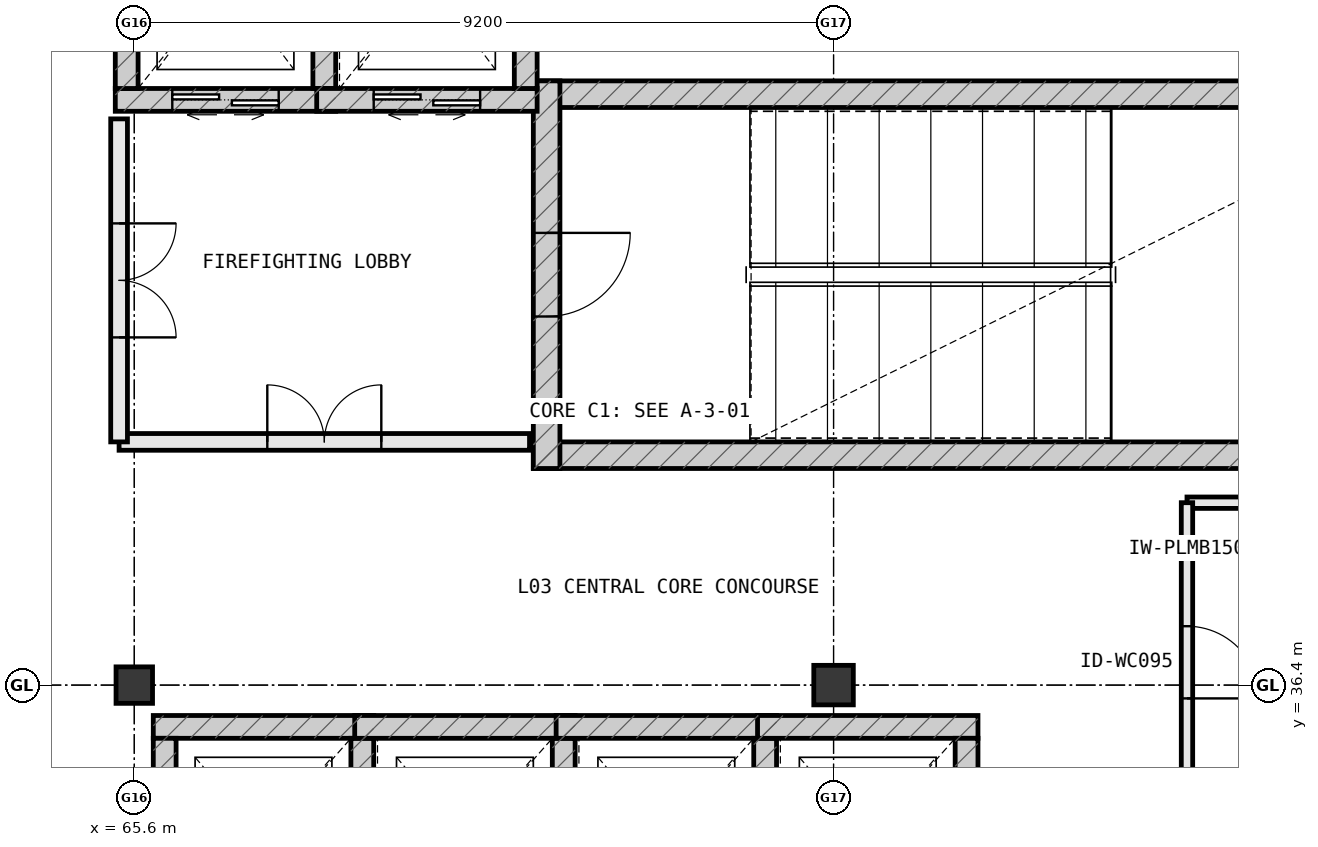
"""IFC4 building model, lengths in metres.
Left out: names, types, materials, properties, quantities, classifications, styles, units other than length and angle.
Written with IfcOpenShell. Run it as: python <this file> out.ifc"""

import sys

from ifc_helpers import new_model, si_unit, direction, frame, frame_2d, origin, origin_2d, place, context, subcontext, project, spatial, rectangle, extrude, element, fill, save


model = new_model("IFC4")
c1 = context("Model", 3, precision=1e-05, world=origin(), true_north=direction((0.0, 1.0)))
c2 = subcontext(c1, "Body", "Model", "MODEL_VIEW")
j1 = project(units=[si_unit("LENGTHUNIT", "METRE"), si_unit("PLANEANGLEUNIT", "RADIAN")], contexts=[c1])
p1 = place(None, origin())
s1 = spatial("IfcSite", under=j1, at=p1, CompositionType="ELEMENT")
p2 = place(p1, origin())
s2 = spatial("IfcBuilding", under=s1, at=p2, CompositionType="ELEMENT")
p3 = place(p2, frame((0.0, 0.0, 16.2)))
s3 = spatial("IfcBuildingStorey", under=s2, at=p3, CompositionType="ELEMENT", Elevation=16.2)
p4 = place(p3, frame((74.8, 36.4, 0.0), z_axis=(0.0, 0.0, 1.0), x_axis=(1.0, 0.0, 0.0)))
e1 = element("IfcColumn", 1, at=p4, inside=s3, PredefinedType="COLUMN", context=c2, shape_type="SweptSolid", body=[
    extrude(rectangle(XDim=0.52, YDim=0.52, at=origin_2d()), origin(), (0.0, 0.0, 1.0), 3.8),
])
p5 = place(p3, frame((65.6, 36.4, 0.0), z_axis=(0.0, 0.0, 1.0), x_axis=(1.0, 0.0, 0.0)))
e2 = element("IfcColumn", 2, at=p5, inside=s3, PredefinedType="COLUMN", context=c2, shape_type="SweptSolid", body=[
    extrude(rectangle(XDim=0.48, YDim=0.48, at=origin_2d()), origin(), (0.0, 0.0, 1.0), 3.8),
])
for number, where, z_axis, x_axis in (
    (3, (70.85, 39.425, 0.0), (0.0, 0.0, 1.0), (1.0, 0.0, 0.0)),
    (4, (82.95, 44.175, 0.0), (0.0, 0.0, 1.0), (-1.0, 0.0, 0.0)),
):
    element("IfcWall", number, at=place(p3, frame(where, z_axis=z_axis, x_axis=x_axis)), inside=s3, PredefinedType="SHEAR", context=c2, shape_type="SweptSolid", body=[
        extrude(rectangle(XDim=12.1, YDim=0.35, at=frame_2d((6.05, 0.0))), origin(), (0.0, 0.0, 1.0), 3.8),
    ])
p6 = place(p3, frame((71.025, 44.35, 0.0), z_axis=(0.0, 0.0, 1.0), x_axis=(0.0, -1.0, 0.0)))
e5 = element("IfcWall", 5, at=p6, inside=s3, PredefinedType="SHEAR", context=c2, shape_type="SweptSolid", body=[
    extrude(rectangle(XDim=5.1, YDim=0.35, at=frame_2d((2.55, 0.0))), origin(), (0.0, 0.0, 1.0), 3.8),
])
p7 = place(p6, frame((2.0, 0.0, 0.0)))
e6 = element("IfcOpeningElement", 6, at=p7, cuts=e5, PredefinedType="OPENING", context=c2, shape_type="SweptSolid", body=[
    extrude(rectangle(XDim=1.1, YDim=2.2, at=frame_2d((0.55, 1.1))), frame((0.0, 0.187, 0.0), z_axis=(0.0, -1.0, 0.0), x_axis=(1.0, 0.0, 0.0)), (0.0, 0.0, 1.0), 0.374),
])
p8 = place(p3, frame((65.35, 44.1, 0.0), z_axis=(0.0, 0.0, 1.0), x_axis=(1.0, 0.0, 0.0)))
e7 = element("IfcWall", 7, at=p8, inside=s3, PredefinedType="SHEAR", context=c2, shape_type="SweptSolid", body=[
    extrude(rectangle(XDim=2.9, YDim=0.3, at=frame_2d((1.45, 0.0))), origin(), (0.0, 0.0, 1.0), 3.8),
])
p9 = place(p8, frame((0.75, 0.0, 0.0)))
e8 = element("IfcOpeningElement", 8, at=p9, cuts=e7, PredefinedType="OPENING", context=c2, shape_type="SweptSolid", body=[
    extrude(rectangle(XDim=1.4, YDim=2.2, at=frame_2d((0.7, 1.1))), frame((0.0, 0.162, 0.0), z_axis=(0.0, -1.0, 0.0), x_axis=(1.0, 0.0, 0.0)), (0.0, 0.0, 1.0), 0.324),
])
for number, where, z_axis, x_axis in (
    (9, (68.1, 44.25, 0.0), (0.0, 0.0, 1.0), (0.0, 1.0, 0.0)),
    (10, (65.5, 47.15, 0.0), (0.0, 0.0, 1.0), (0.0, -1.0, 0.0)),
):
    element("IfcWall", number, at=place(p3, frame(where, z_axis=z_axis, x_axis=x_axis)), inside=s3, PredefinedType="SHEAR", context=c2, shape_type="SweptSolid", body=[
        extrude(rectangle(XDim=2.9, YDim=0.3, at=frame_2d((1.45, 0.0))), origin(), (0.0, 0.0, 1.0), 3.8),
    ])
p10 = place(p3, frame((68.0, 44.1, 0.0), z_axis=(0.0, 0.0, 1.0), x_axis=(1.0, 0.0, 0.0)))
e11 = element("IfcWall", 11, at=p10, inside=s3, PredefinedType="SHEAR", context=c2, shape_type="SweptSolid", body=[
    extrude(rectangle(XDim=2.9, YDim=0.3, at=frame_2d((1.45, 0.0))), origin(), (0.0, 0.0, 1.0), 3.8),
])
p11 = place(p10, frame((0.75, 0.0, 0.0)))
e12 = element("IfcOpeningElement", 12, at=p11, cuts=e11, PredefinedType="OPENING", context=c2, shape_type="SweptSolid", body=[
    extrude(rectangle(XDim=1.4, YDim=2.2, at=frame_2d((0.7, 1.1))), frame((0.0, 0.162, 0.0), z_axis=(0.0, -1.0, 0.0), x_axis=(1.0, 0.0, 0.0)), (0.0, 0.0, 1.0), 0.324),
])
for number, where, z_axis, x_axis in (
    (13, (70.75, 44.25, 0.0), (0.0, 0.0, 1.0), (0.0, 1.0, 0.0)),
    (14, (68.75, 35.85, 0.0), (0.0, 0.0, 1.0), (-1.0, 0.0, 0.0)),
):
    element("IfcWall", number, at=place(p3, frame(where, z_axis=z_axis, x_axis=x_axis)), inside=s3, PredefinedType="SHEAR", context=c2, shape_type="SweptSolid", body=[
        extrude(rectangle(XDim=2.9, YDim=0.3, at=frame_2d((1.45, 0.0))), origin(), (0.0, 0.0, 1.0), 3.8),
    ])
for number, where, z_axis, x_axis in (
    (15, (68.6, 33.1, 0.0), (0.0, 0.0, 1.0), (0.0, 1.0, 0.0)),
    (16, (66.0, 35.7, 0.0), (0.0, 0.0, 1.0), (0.0, -1.0, 0.0)),
):
    element("IfcWall", number, at=place(p3, frame(where, z_axis=z_axis, x_axis=x_axis)), inside=s3, PredefinedType="SHEAR", context=c2, shape_type="SweptSolid", body=[
        extrude(rectangle(XDim=2.6, YDim=0.3, at=frame_2d((1.3, 0.0))), origin(), (0.0, 0.0, 1.0), 3.8),
    ])
p12 = place(p3, frame((71.4, 35.85, 0.0), z_axis=(0.0, 0.0, 1.0), x_axis=(-1.0, 0.0, 0.0)))
e17 = element("IfcWall", 17, at=p12, inside=s3, PredefinedType="SHEAR", context=c2, shape_type="SweptSolid", body=[
    extrude(rectangle(XDim=2.9, YDim=0.3, at=frame_2d((1.45, 0.0))), origin(), (0.0, 0.0, 1.0), 3.8),
])
p13 = place(p3, frame((71.25, 33.1, 0.0), z_axis=(0.0, 0.0, 1.0), x_axis=(0.0, 1.0, 0.0)))
e18 = element("IfcWall", 18, at=p13, inside=s3, PredefinedType="SHEAR", context=c2, shape_type="SweptSolid", body=[
    extrude(rectangle(XDim=2.6, YDim=0.3, at=frame_2d((1.3, 0.0))), origin(), (0.0, 0.0, 1.0), 3.8),
])
p14 = place(p3, frame((74.05, 35.85, 0.0), z_axis=(0.0, 0.0, 1.0), x_axis=(-1.0, 0.0, 0.0)))
e19 = element("IfcWall", 19, at=p14, inside=s3, PredefinedType="SHEAR", context=c2, shape_type="SweptSolid", body=[
    extrude(rectangle(XDim=2.9, YDim=0.3, at=frame_2d((1.45, 0.0))), origin(), (0.0, 0.0, 1.0), 3.8),
])
p15 = place(p3, frame((73.9, 33.1, 0.0), z_axis=(0.0, 0.0, 1.0), x_axis=(0.0, 1.0, 0.0)))
e20 = element("IfcWall", 20, at=p15, inside=s3, PredefinedType="SHEAR", context=c2, shape_type="SweptSolid", body=[
    extrude(rectangle(XDim=2.6, YDim=0.3, at=frame_2d((1.3, 0.0))), origin(), (0.0, 0.0, 1.0), 3.8),
])
p16 = place(p3, frame((76.7, 35.85, 0.0), z_axis=(0.0, 0.0, 1.0), x_axis=(-1.0, 0.0, 0.0)))
e21 = element("IfcWall", 21, at=p16, inside=s3, PredefinedType="SHEAR", context=c2, shape_type="SweptSolid", body=[
    extrude(rectangle(XDim=2.9, YDim=0.3, at=frame_2d((1.45, 0.0))), origin(), (0.0, 0.0, 1.0), 3.8),
])
p17 = place(p3, frame((76.55, 33.1, 0.0), z_axis=(0.0, 0.0, 1.0), x_axis=(0.0, 1.0, 0.0)))
e22 = element("IfcWall", 22, at=p17, inside=s3, PredefinedType="SHEAR", context=c2, shape_type="SweptSolid", body=[
    extrude(rectangle(XDim=2.6, YDim=0.3, at=frame_2d((1.3, 0.0))), origin(), (0.0, 0.0, 1.0), 3.8),
])
p18 = place(p3, frame((65.4, 39.6, 0.0), z_axis=(0.0, 0.0, 1.0), x_axis=(1.0, 0.0, 0.0)))
e23 = element("IfcWall", 23, at=p18, inside=s3, PredefinedType="STANDARD", context=c2, shape_type="SweptSolid", body=[
    extrude(rectangle(XDim=5.4, YDim=0.22, at=frame_2d((2.7, 0.0))), origin(), (0.0, 0.0, 1.0), 3.56),
])
p19 = place(p18, frame((1.95, 0.0, 0.0)))
e24 = element("IfcOpeningElement", 24, at=p19, cuts=e23, PredefinedType="OPENING", context=c2, shape_type="SweptSolid", body=[
    extrude(rectangle(XDim=1.5, YDim=2.2, at=frame_2d((0.75, 1.1))), frame((0.0, 0.122, 0.0), z_axis=(0.0, -1.0, 0.0), x_axis=(1.0, 0.0, 0.0)), (0.0, 0.0, 1.0), 0.244),
])
p20 = place(p3, frame((65.4, 43.85, 0.0), z_axis=(0.0, 0.0, 1.0), x_axis=(0.0, -1.0, 0.0)))
e25 = element("IfcWall", 25, at=p20, inside=s3, PredefinedType="STANDARD", context=c2, shape_type="SweptSolid", body=[
    extrude(rectangle(XDim=4.25, YDim=0.22, at=frame_2d((2.125, 0.0))), origin(), (0.0, 0.0, 1.0), 3.56),
])
p21 = place(p20, frame((1.375, 0.0, 0.0)))
e26 = element("IfcOpeningElement", 26, at=p21, cuts=e25, PredefinedType="OPENING", context=c2, shape_type="SweptSolid", body=[
    extrude(rectangle(XDim=1.5, YDim=2.2, at=frame_2d((0.75, 1.1))), frame((0.0, 0.122, 0.0), z_axis=(0.0, -1.0, 0.0), x_axis=(1.0, 0.0, 0.0)), (0.0, 0.0, 1.0), 0.244),
])
p22 = place(p3, frame((83.55, 38.8, 0.0), z_axis=(0.0, 0.0, 1.0), x_axis=(-1.0, 0.0, 0.0)))
e27 = element("IfcWall", 27, at=p22, inside=s3, PredefinedType="PLUMBINGWALL", context=c2, shape_type="SweptSolid", body=[
    extrude(rectangle(XDim=4.1, YDim=0.15, at=frame_2d((2.05, 0.0))), origin(), (0.0, 0.0, 1.0), 3.56),
])
p23 = place(p3, frame((79.45, 38.8, 0.0), z_axis=(0.0, 0.0, 1.0), x_axis=(0.0, -1.0, 0.0)))
e28 = element("IfcWall", 28, at=p23, inside=s3, PredefinedType="PLUMBINGWALL", context=c2, shape_type="SweptSolid", body=[
    extrude(rectangle(XDim=4.2, YDim=0.15, at=frame_2d((2.1, 0.0))), origin(), (0.0, 0.0, 1.0), 3.56),
])
p24 = place(p23, frame((1.625, 0.0, 0.0)))
e29 = element("IfcOpeningElement", 29, at=p24, cuts=e28, PredefinedType="OPENING", context=c2, shape_type="SweptSolid", body=[
    extrude(rectangle(XDim=0.95, YDim=2.15, at=frame_2d((0.475, 1.075))), frame((0.0, 0.087, 0.0), z_axis=(0.0, -1.0, 0.0), x_axis=(1.0, 0.0, 0.0)), (0.0, 0.0, 1.0), 0.174),
])
p25 = place(p7, origin())
e30 = element("IfcDoor", 30, at=p25, inside=s3, OperationType="SINGLE_SWING_LEFT", PredefinedType="DOOR", context=c2, shape_type="SweptSolid", body=[
    extrude(rectangle(XDim=1.1, YDim=2.2, at=frame_2d((0.55, 1.1))), frame((0.0, 0.025, 0.0), z_axis=(0.0, -1.0, 0.0), x_axis=(1.0, 0.0, 0.0)), (0.0, 0.0, 1.0), 0.05),
])
fill(e6, e30)
p26 = place(p9, origin())
e31 = element("IfcDoor", 31, at=p26, inside=s3, OperationType="DOUBLE_DOOR_SLIDING", PredefinedType="DOOR", context=c2, shape_type="SweptSolid", body=[
    extrude(rectangle(XDim=1.4, YDim=2.2, at=frame_2d((0.7, 1.1))), frame((0.0, 0.025, 0.0), z_axis=(0.0, -1.0, 0.0), x_axis=(1.0, 0.0, 0.0)), (0.0, 0.0, 1.0), 0.05),
])
fill(e8, e31)
p27 = place(p11, origin())
e32 = element("IfcDoor", 32, at=p27, inside=s3, OperationType="DOUBLE_DOOR_SLIDING", PredefinedType="DOOR", context=c2, shape_type="SweptSolid", body=[
    extrude(rectangle(XDim=1.4, YDim=2.2, at=frame_2d((0.7, 1.1))), frame((0.0, 0.025, 0.0), z_axis=(0.0, -1.0, 0.0), x_axis=(1.0, 0.0, 0.0)), (0.0, 0.0, 1.0), 0.05),
])
fill(e12, e32)
p28 = place(p19, origin())
e33 = element("IfcDoor", 33, at=p28, inside=s3, OperationType="DOUBLE_DOOR_SINGLE_SWING", PredefinedType="DOOR", context=c2, shape_type="SweptSolid", body=[
    extrude(rectangle(XDim=1.5, YDim=2.2, at=frame_2d((0.75, 1.1))), frame((0.0, 0.025, 0.0), z_axis=(0.0, -1.0, 0.0), x_axis=(1.0, 0.0, 0.0)), (0.0, 0.0, 1.0), 0.05),
])
fill(e24, e33)
p29 = place(p21, origin())
e34 = element("IfcDoor", 34, at=p29, inside=s3, OperationType="DOUBLE_DOOR_SINGLE_SWING", PredefinedType="DOOR", context=c2, shape_type="SweptSolid", body=[
    extrude(rectangle(XDim=1.5, YDim=2.2, at=frame_2d((0.75, 1.1))), frame((0.0, 0.025, 0.0), z_axis=(0.0, -1.0, 0.0), x_axis=(1.0, 0.0, 0.0)), (0.0, 0.0, 1.0), 0.05),
])
fill(e26, e34)
p30 = place(p24, origin())
e35 = element("IfcDoor", 35, at=p30, inside=s3, OperationType="SINGLE_SWING_RIGHT", PredefinedType="DOOR", context=c2, shape_type="SweptSolid", body=[
    extrude(rectangle(XDim=0.95, YDim=2.15, at=frame_2d((0.475, 1.075))), frame((0.0, 0.025, 0.0), z_axis=(0.0, -1.0, 0.0), x_axis=(1.0, 0.0, 0.0)), (0.0, 0.0, 1.0), 0.05),
])
fill(e29, e35)
save(model, sys.argv[1])
